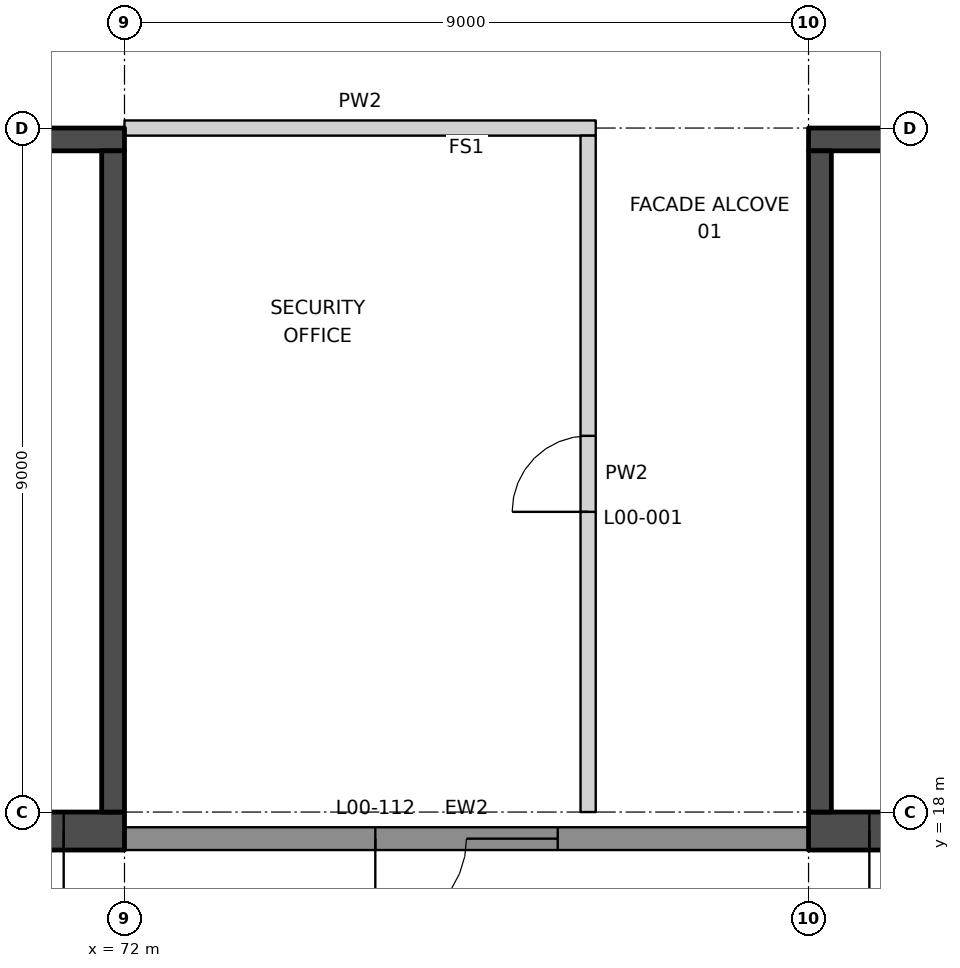
"""IFC4 building model, lengths in metres.
Left out: names, types, materials, properties, quantities, classifications, styles, units other than length and angle.
Written with IfcOpenShell. Run it as: python <this file> out.ifc"""

import sys

from ifc_helpers import new_model, si_unit, direction, frame, frame_2d, origin, place, context, subcontext, project, spatial, rectangle, extrude, element, fill, save


model = new_model("IFC4")
c1 = context("Model", 3, precision=1e-05, world=origin(), true_north=direction((0.0, 1.0)))
c2 = subcontext(c1, "Body", "Model", "MODEL_VIEW")
j1 = project(units=[si_unit("LENGTHUNIT", "METRE"), si_unit("PLANEANGLEUNIT", "RADIAN")], contexts=[c1])
p1 = place(None, origin())
s1 = spatial("IfcSite", under=j1, at=p1, CompositionType="ELEMENT")
p2 = place(p1, origin())
s2 = spatial("IfcBuilding", under=s1, at=p2, CompositionType="ELEMENT")
p3 = place(p2, origin())
s3 = spatial("IfcBuildingStorey", under=s2, at=p3, CompositionType="ELEMENT", Elevation=0.0)
p4 = place(p3, frame((72.0, 27.0, 0.0), z_axis=(0.0, 0.0, 1.0), x_axis=(1.0, 0.0, 0.0)))
e1 = element("IfcWall", 1, at=p4, inside=s3, PredefinedType="PARTITIONING", context=c2, shape_type="SweptSolid", body=[
    extrude(rectangle(XDim=6.2, YDim=0.2, at=frame_2d((3.1, 0.0))), origin(), (0.0, 0.0, 1.0), 5.65),
])
p5 = place(p3, frame((78.1, 18.0, 0.0), z_axis=(0.0, 0.0, 1.0), x_axis=(0.0, 1.0, 0.0)))
e2 = element("IfcWall", 2, at=p5, inside=s3, PredefinedType="PARTITIONING", context=c2, shape_type="SweptSolid", body=[
    extrude(rectangle(XDim=8.9, YDim=0.2, at=frame_2d((4.45, 0.0))), origin(), (0.0, 0.0, 1.0), 7.0),
])
p6 = place(p5, frame((3.95, 0.0, 0.0)))
e3 = element("IfcOpeningElement", 3, at=p6, cuts=e2, PredefinedType="OPENING", context=c2, shape_type="SweptSolid", body=[
    extrude(rectangle(XDim=1.0, YDim=2.1, at=frame_2d((0.5, 1.05))), frame((0.0, 0.11, 0.0), z_axis=(0.0, -1.0, 0.0), x_axis=(1.0, 0.0, 0.0)), (0.0, 0.0, 1.0), 0.22),
])
p7 = place(p3, frame((72.0, 17.65, 0.0), z_axis=(0.0, 0.0, 1.0), x_axis=(1.0, 0.0, 0.0)))
e4 = element("IfcWall", 4, at=p7, inside=s3, PredefinedType="SOLIDWALL", context=c2, shape_type="SweptSolid", body=[
    extrude(rectangle(XDim=9.0, YDim=0.3, at=frame_2d((4.5, 0.0))), origin(), (0.0, 0.0, 1.0), 7.0),
])
p8 = place(p7, frame((3.3, 0.0, 0.0)))
e5 = element("IfcOpeningElement", 5, at=p8, cuts=e4, PredefinedType="OPENING", context=c2, shape_type="SweptSolid", body=[
    extrude(rectangle(XDim=2.4, YDim=2.4, at=frame_2d((1.2, 1.2))), frame((0.0, 0.16, 0.0), z_axis=(0.0, -1.0, 0.0), x_axis=(1.0, 0.0, 0.0)), (0.0, 0.0, 1.0), 0.32),
])
p9 = place(p3, frame((81.0, 26.85, 0.0), z_axis=(0.0, 0.0, 1.0), x_axis=(1.0, 0.0, 0.0)))
e6 = element("IfcWall", 6, at=p9, inside=s3, PredefinedType="SHEAR", context=c2, shape_type="SweptSolid", body=[
    extrude(rectangle(XDim=18.0, YDim=0.3, at=frame_2d((9.0, 0.0))), origin(), (0.0, 0.0, 1.0), 7.0),
])
p10 = place(p9, frame((1.5, 0.0, 0.0)))
e7 = element("IfcOpeningElement", 7, at=p10, cuts=e6, PredefinedType="OPENING", context=c2, shape_type="SweptSolid", body=[
    extrude(rectangle(XDim=1.2, YDim=2.1, at=frame_2d((0.6, 1.05))), frame((0.0, 0.16, 0.0), z_axis=(0.0, -1.0, 0.0), x_axis=(1.0, 0.0, 0.0)), (0.0, 0.0, 1.0), 0.32),
])
p11 = place(p3, frame((81.0, 17.75, 0.0), z_axis=(0.0, 0.0, 1.0), x_axis=(1.0, 0.0, 0.0)))
e8 = element("IfcWall", 8, at=p11, inside=s3, PredefinedType="SHEAR", context=c2, shape_type="SweptSolid", body=[
    extrude(rectangle(XDim=18.0, YDim=0.5, at=frame_2d((9.0, 0.0))), origin(), (0.0, 0.0, 1.0), 7.0),
])
p12 = place(p11, frame((0.8, 0.0, 0.0)))
e9 = element("IfcOpeningElement", 9, at=p12, cuts=e8, PredefinedType="OPENING", context=c2, shape_type="SweptSolid", body=[
    extrude(rectangle(XDim=2.6, YDim=2.4, at=frame_2d((1.3, 1.2))), frame((0.0, 0.26, 0.0), z_axis=(0.0, -1.0, 0.0), x_axis=(1.0, 0.0, 0.0)), (0.0, 0.0, 1.0), 0.52),
])
p13 = place(p3, frame((81.15, 26.7, 0.0), z_axis=(0.0, 0.0, 1.0), x_axis=(0.0, -1.0, 0.0)))
e10 = element("IfcWall", 10, at=p13, inside=s3, PredefinedType="SHEAR", context=c2, shape_type="SweptSolid", body=[
    extrude(rectangle(XDim=8.7, YDim=0.3, at=frame_2d((4.35, 0.0))), origin(), (0.0, 0.0, 1.0), 7.0),
])
p14 = place(p3, frame((72.0, 26.85, 0.0), z_axis=(0.0, 0.0, 1.0), x_axis=(-1.0, 0.0, 0.0)))
e11 = element("IfcWall", 11, at=p14, inside=s3, PredefinedType="SHEAR", context=c2, shape_type="SweptSolid", body=[
    extrude(rectangle(XDim=18.25, YDim=0.3, at=frame_2d((9.125, 0.0))), origin(), (0.0, 0.0, 1.0), 7.0),
])
p15 = place(p14, frame((1.5, 0.0, 0.0)))
e12 = element("IfcOpeningElement", 12, at=p15, cuts=e11, PredefinedType="OPENING", context=c2, shape_type="SweptSolid", body=[
    extrude(rectangle(XDim=1.2, YDim=2.1, at=frame_2d((0.6, 1.05))), frame((0.0, 0.16, 0.0), z_axis=(0.0, -1.0, 0.0), x_axis=(1.0, 0.0, 0.0)), (0.0, 0.0, 1.0), 0.32),
])
p16 = place(p3, frame((72.0, 17.75, 0.0), z_axis=(0.0, 0.0, 1.0), x_axis=(-1.0, 0.0, 0.0)))
e13 = element("IfcWall", 13, at=p16, inside=s3, PredefinedType="SHEAR", context=c2, shape_type="SweptSolid", body=[
    extrude(rectangle(XDim=18.0, YDim=0.5, at=frame_2d((9.0, 0.0))), origin(), (0.0, 0.0, 1.0), 7.0),
])
p17 = place(p16, frame((0.8, 0.0, 0.0)))
e14 = element("IfcOpeningElement", 14, at=p17, cuts=e13, PredefinedType="OPENING", context=c2, shape_type="SweptSolid", body=[
    extrude(rectangle(XDim=2.6, YDim=2.4, at=frame_2d((1.3, 1.2))), frame((0.0, 0.26, 0.0), z_axis=(0.0, -1.0, 0.0), x_axis=(1.0, 0.0, 0.0)), (0.0, 0.0, 1.0), 0.52),
])
p18 = place(p3, frame((71.85, 26.7, 0.0), z_axis=(0.0, 0.0, 1.0), x_axis=(0.0, -1.0, 0.0)))
e15 = element("IfcWall", 15, at=p18, inside=s3, PredefinedType="SHEAR", context=c2, shape_type="SweptSolid", body=[
    extrude(rectangle(XDim=8.7, YDim=0.3, at=frame_2d((4.35, 0.0))), origin(), (0.0, 0.0, 1.0), 7.0),
])
p19 = place(p6, origin())
e16 = element("IfcDoor", 16, at=p19, inside=s3, OperationType="SINGLE_SWING_LEFT", PredefinedType="DOOR", context=c2, shape_type="SweptSolid", body=[
    extrude(rectangle(XDim=1.0, YDim=2.1, at=frame_2d((0.5, 1.05))), frame((0.0, 0.025, 0.0), z_axis=(0.0, -1.0, 0.0), x_axis=(1.0, 0.0, 0.0)), (0.0, 0.0, 1.0), 0.05),
])
fill(e3, e16)
p20 = place(p8, frame((2.4, 0.0, 0.0), z_axis=(0.0, 0.0, 1.0), x_axis=(-1.0, 0.0, 0.0)))
e17 = element("IfcDoor", 17, at=p20, inside=s3, OperationType="DOUBLE_DOOR_SINGLE_SWING", PredefinedType="DOOR", context=c2, shape_type="SweptSolid", body=[
    extrude(rectangle(XDim=2.4, YDim=2.4, at=frame_2d((1.2, 1.2))), frame((0.0, 0.025, 0.0), z_axis=(0.0, -1.0, 0.0), x_axis=(1.0, 0.0, 0.0)), (0.0, 0.0, 1.0), 0.05),
])
fill(e5, e17)
p21 = place(p12, frame((2.6, 0.0, 0.0), z_axis=(0.0, 0.0, 1.0), x_axis=(-1.0, 0.0, 0.0)))
e18 = element("IfcDoor", 18, at=p21, inside=s3, OperationType="DOUBLE_DOOR_SINGLE_SWING", PredefinedType="DOOR", context=c2, shape_type="SweptSolid", body=[
    extrude(rectangle(XDim=2.6, YDim=2.4, at=frame_2d((1.3, 1.2))), frame((0.0, 0.025, 0.0), z_axis=(0.0, -1.0, 0.0), x_axis=(1.0, 0.0, 0.0)), (0.0, 0.0, 1.0), 0.05),
])
fill(e9, e18)
p22 = place(p17, origin())
e19 = element("IfcDoor", 19, at=p22, inside=s3, OperationType="DOUBLE_DOOR_SINGLE_SWING", PredefinedType="DOOR", context=c2, shape_type="SweptSolid", body=[
    extrude(rectangle(XDim=2.6, YDim=2.4, at=frame_2d((1.3, 1.2))), frame((0.0, 0.025, 0.0), z_axis=(0.0, -1.0, 0.0), x_axis=(1.0, 0.0, 0.0)), (0.0, 0.0, 1.0), 0.05),
])
fill(e14, e19)
save(model, sys.argv[1])
